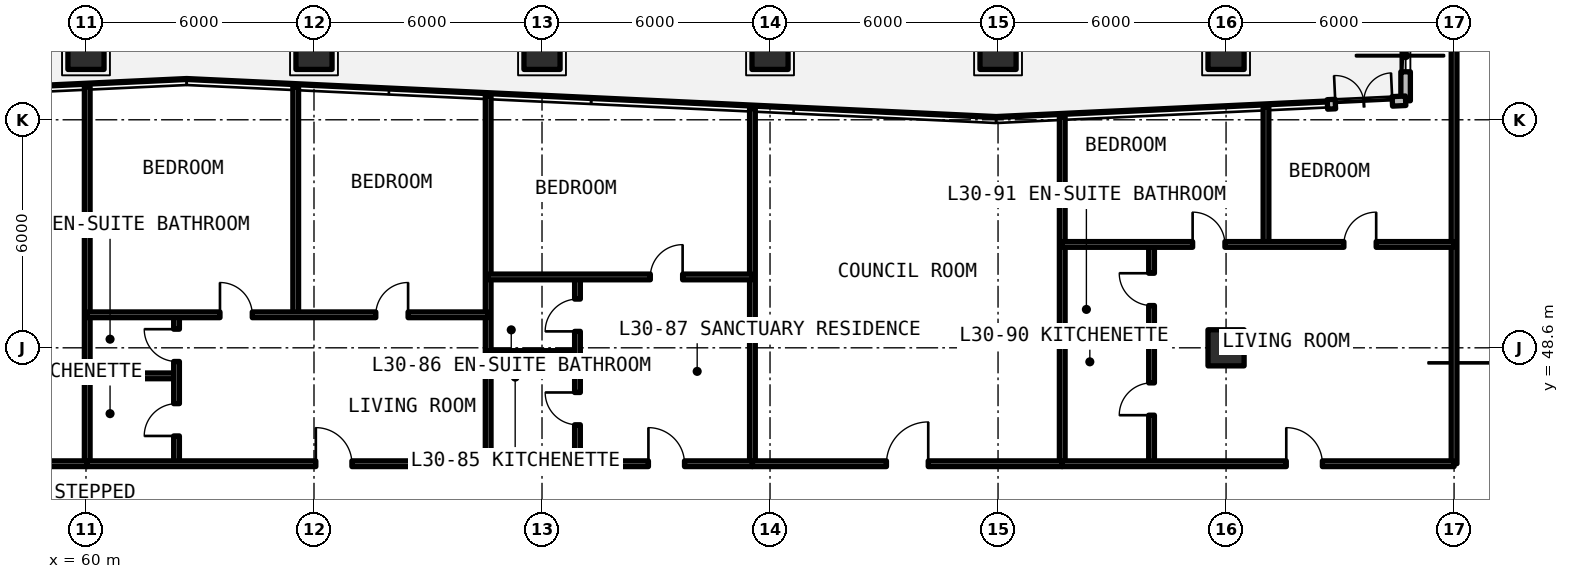
"""IFC4 building model, lengths in metres.
Left out: names, types, materials, properties, quantities, classifications, styles, units other than length and angle.
Written with IfcOpenShell. Run it as: python <this file> out.ifc"""

import sys

from ifc_helpers import new_model, si_unit, direction, frame, frame_2d, origin, origin_2d, place, context, subcontext, project, spatial, rectangle, extrude, element, fill, save


model = new_model("IFC4")
c1 = context("Model", 3, precision=1e-05, world=origin(), true_north=direction((0.0, 1.0)))
c2 = subcontext(c1, "Body", "Model", "MODEL_VIEW")
j1 = project(units=[si_unit("LENGTHUNIT", "METRE"), si_unit("PLANEANGLEUNIT", "RADIAN")], contexts=[c1])
p1 = place(None, origin())
s1 = spatial("IfcSite", under=j1, at=p1, CompositionType="ELEMENT")
p2 = place(p1, origin())
s2 = spatial("IfcBuilding", under=s1, at=p2, CompositionType="ELEMENT")
p3 = place(p2, frame((0.0, 0.0, 108.57)))
s3 = spatial("IfcBuildingStorey", under=s2, at=p3, CompositionType="ELEMENT", Elevation=108.57)
for number, where, z_axis, x_axis in (
    (1, (90.0, 48.6, 0.0), (0.0, 0.0, 1.0), (1.0, 0.0, 0.0)),
    (2, (60.0, 56.4, 0.0), (0.0, 0.0, 1.0), (1.0, 0.0, 0.0)),
    (3, (66.0, 56.4, 0.0), (0.0, 0.0, 1.0), (1.0, 0.0, 0.0)),
    (4, (72.0, 56.4, 0.0), (0.0, 0.0, 1.0), (1.0, 0.0, 0.0)),
    (5, (78.0, 56.4, 0.0), (0.0, 0.0, 1.0), (1.0, 0.0, 0.0)),
    (6, (84.0, 56.4, 0.0), (0.0, 0.0, 1.0), (1.0, 0.0, 0.0)),
    (7, (90.0, 56.4, 0.0), (0.0, 0.0, 1.0), (1.0, 0.0, 0.0)),
):
    element("IfcColumn", number, at=place(p3, frame(where, z_axis=z_axis, x_axis=x_axis)), inside=s3, PredefinedType="COLUMN", context=c2, shape_type="SweptSolid", body=[
        extrude(rectangle(XDim=0.95, YDim=0.95, at=origin_2d()), origin(), (0.0, 0.0, 1.0), 3.63),
    ])
p4 = place(p3, frame((94.725, 57.475, 0.0), z_axis=(0.0, 0.0, 1.0), x_axis=(0.0, -1.0, 0.0)))
e8 = element("IfcWall", 8, at=p4, inside=s3, PredefinedType="SOLIDWALL", context=c2, shape_type="SweptSolid", body=[
    extrude(rectangle(XDim=2.375, YDim=0.25, at=frame_2d((1.187, 0.0))), origin(), (0.0, 0.0, 1.0), 3.41),
])
p5 = place(p4, frame((0.762, 0.0, 0.78)))
e9 = element("IfcOpeningElement", 9, at=p5, cuts=e8, PredefinedType="OPENING", context=c2, shape_type="SweptSolid", body=[
    extrude(rectangle(XDim=0.85, YDim=1.65, at=frame_2d((0.425, 0.825))), frame((0.0, 0.135, 0.0), z_axis=(0.0, -1.0, 0.0), x_axis=(1.0, 0.0, 0.0)), (0.0, 0.0, 1.0), 0.27),
])
p6 = place(p3, frame((94.725, 55.101, 0.0), z_axis=(0.0, 0.0, 1.0), x_axis=(-0.998903780539, -0.046810652902, 0.0)))
e10 = element("IfcWall", 10, at=p6, inside=s3, PredefinedType="SOLIDWALL", context=c2, shape_type="SweptSolid", body=[
    extrude(rectangle(XDim=2.06, YDim=0.25, at=frame_2d((1.03, 0.0))), origin(), (0.0, 0.0, 1.0), 3.41),
])
p7 = place(p6, frame((0.35, 0.0, 0.0)))
e11 = element("IfcOpeningElement", 11, at=p7, cuts=e10, PredefinedType="OPENING", context=c2, shape_type="SweptSolid", body=[
    extrude(rectangle(XDim=1.5, YDim=2.2, at=frame_2d((0.75, 1.1))), frame((0.0, 0.135, 0.0), z_axis=(0.0, -1.0, 0.0), x_axis=(1.0, 0.0, 0.0)), (0.0, 0.0, 1.0), 0.27),
])
p8 = place(p3, frame((96.0, 45.55, 0.0), z_axis=(0.0, 0.0, 1.0), x_axis=(0.0, 1.0, 0.0)))
e12 = element("IfcWall", 12, at=p8, inside=s3, PredefinedType="SOLIDWALL", context=c2, shape_type="SweptSolid", body=[
    extrude(rectangle(XDim=11.925, YDim=0.15, at=frame_2d((5.962, 0.0))), origin(), (0.0, 0.0, 1.0), 2.63),
])
p9 = place(p3, frame((60.033, 45.55, 0.0), z_axis=(0.0, 0.0, 1.0), x_axis=(0.0, 1.0, 0.0)))
e13 = element("IfcWall", 13, at=p9, inside=s3, PredefinedType="SOLIDWALL", context=c2, shape_type="SweptSolid", body=[
    extrude(rectangle(XDim=9.922, YDim=0.15, at=frame_2d((4.961, 0.0))), origin(), (0.0, 0.0, 1.0), 2.63),
])
p10 = place(p3, frame((52.12, 45.55, 0.0), z_axis=(0.0, 0.0, 1.0), x_axis=(1.0, 0.0, 0.0)))
e14 = element("IfcWall", 14, at=p10, inside=s3, PredefinedType="SOLIDWALL", context=c2, shape_type="SweptSolid", body=[
    extrude(rectangle(XDim=7.913, YDim=0.15, at=frame_2d((3.956, 0.0))), origin(), (0.0, 0.0, 1.0), 2.63),
])
p11 = place(p10, frame((3.406, 0.0, 0.0)))
e15 = element("IfcOpeningElement", 15, at=p11, cuts=e14, PredefinedType="OPENING", context=c2, shape_type="SweptSolid", body=[
    extrude(rectangle(XDim=1.1, YDim=2.15, at=frame_2d((0.55, 1.075))), frame((0.0, 0.085, 0.0), z_axis=(0.0, -1.0, 0.0), x_axis=(1.0, 0.0, 0.0)), (0.0, 0.0, 1.0), 0.17),
])
p12 = place(p3, frame((70.583, 45.55, 0.0), z_axis=(0.0, 0.0, 1.0), x_axis=(0.0, 1.0, 0.0)))
e16 = element("IfcWall", 16, at=p12, inside=s3, PredefinedType="SOLIDWALL", context=c2, shape_type="SweptSolid", body=[
    extrude(rectangle(XDim=9.672, YDim=0.15, at=frame_2d((4.836, 0.0))), origin(), (0.0, 0.0, 1.0), 2.63),
])
p13 = place(p3, frame((60.033, 47.862, 0.0), z_axis=(0.0, 0.0, 1.0), x_axis=(1.0, 0.0, 0.0)))
e17 = element("IfcWall", 17, at=p13, inside=s3, PredefinedType="PARTITIONING", context=c2, shape_type="SweptSolid", body=[
    extrude(rectangle(XDim=2.35, YDim=0.15, at=frame_2d((1.175, 0.0))), origin(), (0.0, 0.0, 1.0), 2.63),
])
p14 = place(p3, frame((62.383, 45.55, 0.0), z_axis=(0.0, 0.0, 1.0), x_axis=(0.0, 1.0, 0.0)))
e18 = element("IfcWall", 18, at=p14, inside=s3, PredefinedType="PARTITIONING", context=c2, shape_type="SweptSolid", body=[
    extrude(rectangle(XDim=3.918, YDim=0.15, at=frame_2d((1.959, 0.0))), origin(), (0.0, 0.0, 1.0), 2.63),
])
p15 = place(p14, frame((0.731, 0.0, 0.0)))
e19 = element("IfcOpeningElement", 19, at=p15, cuts=e18, PredefinedType="OPENING", context=c2, shape_type="SweptSolid", body=[
    extrude(rectangle(XDim=0.85, YDim=2.1, at=frame_2d((0.425, 1.05))), frame((0.0, 0.085, 0.0), z_axis=(0.0, -1.0, 0.0), x_axis=(1.0, 0.0, 0.0)), (0.0, 0.0, 1.0), 0.17),
])
p16 = place(p14, frame((2.69, 0.0, 0.0)))
e20 = element("IfcOpeningElement", 20, at=p16, cuts=e18, PredefinedType="OPENING", context=c2, shape_type="SweptSolid", body=[
    extrude(rectangle(XDim=0.85, YDim=2.1, at=frame_2d((0.425, 1.05))), frame((0.0, 0.085, 0.0), z_axis=(0.0, -1.0, 0.0), x_axis=(1.0, 0.0, 0.0)), (0.0, 0.0, 1.0), 0.17),
])
p17 = place(p3, frame((65.519, 49.469, 0.0), z_axis=(0.0, 0.0, 1.0), x_axis=(0.0, 1.0, 0.0)))
e21 = element("IfcWall", 21, at=p17, inside=s3, PredefinedType="PARTITIONING", context=c2, shape_type="SweptSolid", body=[
    extrude(rectangle(XDim=5.992, YDim=0.15, at=frame_2d((2.996, 0.0))), origin(), (0.0, 0.0, 1.0), 2.63),
])
p18 = place(p3, frame((60.033, 49.469, 0.0), z_axis=(0.0, 0.0, 1.0), x_axis=(1.0, 0.0, 0.0)))
e22 = element("IfcWall", 22, at=p18, inside=s3, PredefinedType="PARTITIONING", context=c2, shape_type="SweptSolid", body=[
    extrude(rectangle(XDim=10.551, YDim=0.15, at=frame_2d((5.275, 0.0))), origin(), (0.0, 0.0, 1.0), 2.63),
])
p19 = place(p18, frame((3.493, 0.0, 0.0)))
e23 = element("IfcOpeningElement", 23, at=p19, cuts=e22, PredefinedType="OPENING", context=c2, shape_type="SweptSolid", body=[
    extrude(rectangle(XDim=0.85, YDim=2.1, at=frame_2d((0.425, 1.05))), frame((0.0, 0.085, 0.0), z_axis=(0.0, -1.0, 0.0), x_axis=(1.0, 0.0, 0.0)), (0.0, 0.0, 1.0), 0.17),
])
p20 = place(p18, frame((7.593, 0.0, 0.0)))
e24 = element("IfcOpeningElement", 24, at=p20, cuts=e22, PredefinedType="OPENING", context=c2, shape_type="SweptSolid", body=[
    extrude(rectangle(XDim=0.85, YDim=2.1, at=frame_2d((0.425, 1.05))), frame((0.0, 0.085, 0.0), z_axis=(0.0, -1.0, 0.0), x_axis=(1.0, 0.0, 0.0)), (0.0, 0.0, 1.0), 0.17),
])
p21 = place(p3, frame((60.033, 45.55, 0.0), z_axis=(0.0, 0.0, 1.0), x_axis=(1.0, 0.0, 0.0)))
e25 = element("IfcWall", 25, at=p21, inside=s3, PredefinedType="SOLIDWALL", context=c2, shape_type="SweptSolid", body=[
    extrude(rectangle(XDim=10.551, YDim=0.15, at=frame_2d((5.275, 0.0))), origin(), (0.0, 0.0, 1.0), 2.63),
])
p22 = place(p21, frame((6.015, 0.0, 0.0)))
e26 = element("IfcOpeningElement", 26, at=p22, cuts=e25, PredefinedType="OPENING", context=c2, shape_type="SweptSolid", body=[
    extrude(rectangle(XDim=0.95, YDim=2.15, at=frame_2d((0.475, 1.075))), frame((0.0, 0.085, 0.0), z_axis=(0.0, -1.0, 0.0), x_axis=(1.0, 0.0, 0.0)), (0.0, 0.0, 1.0), 0.17),
])
p23 = place(p3, frame((77.537, 45.55, 0.0), z_axis=(0.0, 0.0, 1.0), x_axis=(0.0, 1.0, 0.0)))
e27 = element("IfcWall", 27, at=p23, inside=s3, PredefinedType="SOLIDWALL", context=c2, shape_type="SweptSolid", body=[
    extrude(rectangle(XDim=9.346, YDim=0.15, at=frame_2d((4.673, 0.0))), origin(), (0.0, 0.0, 1.0), 2.63),
])
p24 = place(p3, frame((70.583, 48.45, 0.0), z_axis=(0.0, 0.0, 1.0), x_axis=(1.0, 0.0, 0.0)))
e28 = element("IfcWall", 28, at=p24, inside=s3, PredefinedType="PARTITIONING", context=c2, shape_type="SweptSolid", body=[
    extrude(rectangle(XDim=2.35, YDim=0.15, at=frame_2d((1.175, 0.0))), origin(), (0.0, 0.0, 1.0), 2.63),
])
p25 = place(p3, frame((72.933, 45.55, 0.0), z_axis=(0.0, 0.0, 1.0), x_axis=(0.0, 1.0, 0.0)))
e29 = element("IfcWall", 29, at=p25, inside=s3, PredefinedType="PARTITIONING", context=c2, shape_type="SweptSolid", body=[
    extrude(rectangle(XDim=4.915, YDim=0.15, at=frame_2d((2.458, 0.0))), origin(), (0.0, 0.0, 1.0), 2.63),
])
p26 = place(p25, frame((1.025, 0.0, 0.0)))
e30 = element("IfcOpeningElement", 30, at=p26, cuts=e29, PredefinedType="OPENING", context=c2, shape_type="SweptSolid", body=[
    extrude(rectangle(XDim=0.85, YDim=2.1, at=frame_2d((0.425, 1.05))), frame((0.0, 0.085, 0.0), z_axis=(0.0, -1.0, 0.0), x_axis=(1.0, 0.0, 0.0)), (0.0, 0.0, 1.0), 0.17),
])
p27 = place(p25, frame((3.482, 0.0, 0.0)))
e31 = element("IfcOpeningElement", 31, at=p27, cuts=e29, PredefinedType="OPENING", context=c2, shape_type="SweptSolid", body=[
    extrude(rectangle(XDim=0.85, YDim=2.1, at=frame_2d((0.425, 1.05))), frame((0.0, 0.085, 0.0), z_axis=(0.0, -1.0, 0.0), x_axis=(1.0, 0.0, 0.0)), (0.0, 0.0, 1.0), 0.17),
])
p28 = place(p3, frame((70.583, 50.465, 0.0), z_axis=(0.0, 0.0, 1.0), x_axis=(1.0, 0.0, 0.0)))
e32 = element("IfcWall", 32, at=p28, inside=s3, PredefinedType="PARTITIONING", context=c2, shape_type="SweptSolid", body=[
    extrude(rectangle(XDim=6.954, YDim=0.15, at=frame_2d((3.477, 0.0))), origin(), (0.0, 0.0, 1.0), 2.63),
])
p29 = place(p28, frame((4.267, 0.0, 0.0)))
e33 = element("IfcOpeningElement", 33, at=p29, cuts=e32, PredefinedType="OPENING", context=c2, shape_type="SweptSolid", body=[
    extrude(rectangle(XDim=0.85, YDim=2.1, at=frame_2d((0.425, 1.05))), frame((0.0, 0.085, 0.0), z_axis=(0.0, -1.0, 0.0), x_axis=(1.0, 0.0, 0.0)), (0.0, 0.0, 1.0), 0.17),
])
p30 = place(p3, frame((70.583, 45.55, 0.0), z_axis=(0.0, 0.0, 1.0), x_axis=(1.0, 0.0, 0.0)))
e34 = element("IfcWall", 34, at=p30, inside=s3, PredefinedType="SOLIDWALL", context=c2, shape_type="SweptSolid", body=[
    extrude(rectangle(XDim=6.954, YDim=0.15, at=frame_2d((3.477, 0.0))), origin(), (0.0, 0.0, 1.0), 2.63),
])
p31 = place(p30, frame((4.217, 0.0, 0.0)))
e35 = element("IfcOpeningElement", 35, at=p31, cuts=e34, PredefinedType="OPENING", context=c2, shape_type="SweptSolid", body=[
    extrude(rectangle(XDim=0.95, YDim=2.15, at=frame_2d((0.475, 1.075))), frame((0.0, 0.085, 0.0), z_axis=(0.0, -1.0, 0.0), x_axis=(1.0, 0.0, 0.0)), (0.0, 0.0, 1.0), 0.17),
])
p32 = place(p3, frame((85.689, 45.55, 0.0), z_axis=(0.0, 0.0, 1.0), x_axis=(0.0, 1.0, 0.0)))
e36 = element("IfcWall", 36, at=p32, inside=s3, PredefinedType="SOLIDWALL", context=c2, shape_type="SweptSolid", body=[
    extrude(rectangle(XDim=9.126, YDim=0.15, at=frame_2d((4.563, 0.0))), origin(), (0.0, 0.0, 1.0), 2.63),
])
p33 = place(p3, frame((77.537, 45.55, 0.0), z_axis=(0.0, 0.0, 1.0), x_axis=(1.0, 0.0, 0.0)))
e37 = element("IfcWall", 37, at=p33, inside=s3, PredefinedType="SOLIDWALL", context=c2, shape_type="SweptSolid", body=[
    extrude(rectangle(XDim=8.153, YDim=0.15, at=frame_2d((4.076, 0.0))), origin(), (0.0, 0.0, 1.0), 2.63),
])
p34 = place(p33, frame((3.526, 0.0, 0.0)))
e38 = element("IfcOpeningElement", 38, at=p34, cuts=e37, PredefinedType="OPENING", context=c2, shape_type="SweptSolid", body=[
    extrude(rectangle(XDim=1.1, YDim=2.15, at=frame_2d((0.55, 1.075))), frame((0.0, 0.085, 0.0), z_axis=(0.0, -1.0, 0.0), x_axis=(1.0, 0.0, 0.0)), (0.0, 0.0, 1.0), 0.17),
])
p35 = place(p3, frame((85.689, 48.954, 0.0), z_axis=(0.0, 0.0, 1.0), x_axis=(1.0, 0.0, 0.0)))
e39 = element("IfcWall", 39, at=p35, inside=s3, PredefinedType="PARTITIONING", context=c2, shape_type="SweptSolid", body=[
    extrude(rectangle(XDim=2.35, YDim=0.15, at=frame_2d((1.175, 0.0))), origin(), (0.0, 0.0, 1.0), 2.63),
])
p36 = place(p3, frame((88.04, 45.55, 0.0), z_axis=(0.0, 0.0, 1.0), x_axis=(0.0, 1.0, 0.0)))
e40 = element("IfcWall", 40, at=p36, inside=s3, PredefinedType="PARTITIONING", context=c2, shape_type="SweptSolid", body=[
    extrude(rectangle(XDim=5.77, YDim=0.15, at=frame_2d((2.885, 0.0))), origin(), (0.0, 0.0, 1.0), 2.63),
])
p37 = place(p36, frame((1.277, 0.0, 0.0)))
e41 = element("IfcOpeningElement", 41, at=p37, cuts=e40, PredefinedType="OPENING", context=c2, shape_type="SweptSolid", body=[
    extrude(rectangle(XDim=0.85, YDim=2.1, at=frame_2d((0.425, 1.05))), frame((0.0, 0.085, 0.0), z_axis=(0.0, -1.0, 0.0), x_axis=(1.0, 0.0, 0.0)), (0.0, 0.0, 1.0), 0.17),
])
p38 = place(p36, frame((4.162, 0.0, 0.0)))
e42 = element("IfcOpeningElement", 42, at=p38, cuts=e40, PredefinedType="OPENING", context=c2, shape_type="SweptSolid", body=[
    extrude(rectangle(XDim=0.85, YDim=2.1, at=frame_2d((0.425, 1.05))), frame((0.0, 0.085, 0.0), z_axis=(0.0, -1.0, 0.0), x_axis=(1.0, 0.0, 0.0)), (0.0, 0.0, 1.0), 0.17),
])
p39 = place(p3, frame((91.051, 51.32, 0.0), z_axis=(0.0, 0.0, 1.0), x_axis=(0.0, 1.0, 0.0)))
e43 = element("IfcWall", 43, at=p39, inside=s3, PredefinedType="PARTITIONING", context=c2, shape_type="SweptSolid", body=[
    extrude(rectangle(XDim=3.608, YDim=0.15, at=frame_2d((1.804, 0.0))), origin(), (0.0, 0.0, 1.0), 2.63),
])
p40 = place(p3, frame((85.689, 51.32, 0.0), z_axis=(0.0, 0.0, 1.0), x_axis=(1.0, 0.0, 0.0)))
e44 = element("IfcWall", 44, at=p40, inside=s3, PredefinedType="PARTITIONING", context=c2, shape_type="SweptSolid", body=[
    extrude(rectangle(XDim=10.311, YDim=0.15, at=frame_2d((5.155, 0.0))), origin(), (0.0, 0.0, 1.0), 2.63),
])
p41 = place(p40, frame((3.431, 0.0, 0.0)))
e45 = element("IfcOpeningElement", 45, at=p41, cuts=e44, PredefinedType="OPENING", context=c2, shape_type="SweptSolid", body=[
    extrude(rectangle(XDim=0.85, YDim=2.1, at=frame_2d((0.425, 1.05))), frame((0.0, 0.085, 0.0), z_axis=(0.0, -1.0, 0.0), x_axis=(1.0, 0.0, 0.0)), (0.0, 0.0, 1.0), 0.17),
])
p42 = place(p40, frame((7.411, 0.0, 0.0)))
e46 = element("IfcOpeningElement", 46, at=p42, cuts=e44, PredefinedType="OPENING", context=c2, shape_type="SweptSolid", body=[
    extrude(rectangle(XDim=0.85, YDim=2.1, at=frame_2d((0.425, 1.05))), frame((0.0, 0.085, 0.0), z_axis=(0.0, -1.0, 0.0), x_axis=(1.0, 0.0, 0.0)), (0.0, 0.0, 1.0), 0.17),
])
p43 = place(p3, frame((85.689, 45.55, 0.0), z_axis=(0.0, 0.0, 1.0), x_axis=(1.0, 0.0, 0.0)))
e47 = element("IfcWall", 47, at=p43, inside=s3, PredefinedType="SOLIDWALL", context=c2, shape_type="SweptSolid", body=[
    extrude(rectangle(XDim=10.311, YDim=0.15, at=frame_2d((5.155, 0.0))), origin(), (0.0, 0.0, 1.0), 2.63),
])
p44 = place(p43, frame((5.895, 0.0, 0.0)))
e48 = element("IfcOpeningElement", 48, at=p44, cuts=e47, PredefinedType="OPENING", context=c2, shape_type="SweptSolid", body=[
    extrude(rectangle(XDim=0.95, YDim=2.15, at=frame_2d((0.475, 1.075))), frame((0.0, 0.085, 0.0), z_axis=(0.0, -1.0, 0.0), x_axis=(1.0, 0.0, 0.0)), (0.0, 0.0, 1.0), 0.17),
])
p45 = place(p5, origin())
e49 = element("IfcWindow", 49, at=p45, inside=s3, PartitioningType="SINGLE_PANEL", PredefinedType="WINDOW", context=c2, shape_type="SweptSolid", body=[
    extrude(rectangle(XDim=0.85, YDim=1.65, at=frame_2d((0.425, 0.825))), frame((0.0, 0.03, 0.0), z_axis=(0.0, -1.0, 0.0), x_axis=(1.0, 0.0, 0.0)), (0.0, 0.0, 1.0), 0.06),
])
fill(e9, e49)
p46 = place(p7, frame((1.5, 0.0, 0.0), z_axis=(0.0, 0.0, 1.0), x_axis=(-1.0, 0.0, 0.0)))
e50 = element("IfcDoor", 50, at=p46, inside=s3, OperationType="SINGLE_SWING_RIGHT", PredefinedType="DOOR", context=c2, shape_type="SweptSolid", body=[
    extrude(rectangle(XDim=1.5, YDim=2.2, at=frame_2d((0.75, 1.1))), frame((0.0, 0.025, 0.0), z_axis=(0.0, -1.0, 0.0), x_axis=(1.0, 0.0, 0.0)), (0.0, 0.0, 1.0), 0.05),
])
fill(e11, e50)
p47 = place(p15, origin())
e51 = element("IfcDoor", 51, at=p47, inside=s3, OperationType="SINGLE_SWING_LEFT", PredefinedType="DOOR", context=c2, shape_type="SweptSolid", body=[
    extrude(rectangle(XDim=0.85, YDim=2.1, at=frame_2d((0.425, 1.05))), frame((0.0, 0.025, 0.0), z_axis=(0.0, -1.0, 0.0), x_axis=(1.0, 0.0, 0.0)), (0.0, 0.0, 1.0), 0.05),
])
fill(e19, e51)
p48 = place(p16, origin())
e52 = element("IfcDoor", 52, at=p48, inside=s3, OperationType="SINGLE_SWING_RIGHT", PredefinedType="DOOR", context=c2, shape_type="SweptSolid", body=[
    extrude(rectangle(XDim=0.85, YDim=2.1, at=frame_2d((0.425, 1.05))), frame((0.0, 0.025, 0.0), z_axis=(0.0, -1.0, 0.0), x_axis=(1.0, 0.0, 0.0)), (0.0, 0.0, 1.0), 0.05),
])
fill(e20, e52)
p49 = place(p19, origin())
e53 = element("IfcDoor", 53, at=p49, inside=s3, OperationType="SINGLE_SWING_LEFT", PredefinedType="DOOR", context=c2, shape_type="SweptSolid", body=[
    extrude(rectangle(XDim=0.85, YDim=2.1, at=frame_2d((0.425, 1.05))), frame((0.0, 0.025, 0.0), z_axis=(0.0, -1.0, 0.0), x_axis=(1.0, 0.0, 0.0)), (0.0, 0.0, 1.0), 0.05),
])
fill(e23, e53)
p50 = place(p20, origin())
e54 = element("IfcDoor", 54, at=p50, inside=s3, OperationType="SINGLE_SWING_RIGHT", PredefinedType="DOOR", context=c2, shape_type="SweptSolid", body=[
    extrude(rectangle(XDim=0.85, YDim=2.1, at=frame_2d((0.425, 1.05))), frame((0.0, 0.025, 0.0), z_axis=(0.0, -1.0, 0.0), x_axis=(1.0, 0.0, 0.0)), (0.0, 0.0, 1.0), 0.05),
])
fill(e24, e54)
p51 = place(p22, origin())
e55 = element("IfcDoor", 55, at=p51, inside=s3, OperationType="SINGLE_SWING_LEFT", PredefinedType="DOOR", context=c2, shape_type="SweptSolid", body=[
    extrude(rectangle(XDim=0.95, YDim=2.15, at=frame_2d((0.475, 1.075))), frame((0.0, 0.025, 0.0), z_axis=(0.0, -1.0, 0.0), x_axis=(1.0, 0.0, 0.0)), (0.0, 0.0, 1.0), 0.05),
])
fill(e26, e55)
p52 = place(p26, origin())
e56 = element("IfcDoor", 56, at=p52, inside=s3, OperationType="SINGLE_SWING_RIGHT", PredefinedType="DOOR", context=c2, shape_type="SweptSolid", body=[
    extrude(rectangle(XDim=0.85, YDim=2.1, at=frame_2d((0.425, 1.05))), frame((0.0, 0.025, 0.0), z_axis=(0.0, -1.0, 0.0), x_axis=(1.0, 0.0, 0.0)), (0.0, 0.0, 1.0), 0.05),
])
fill(e30, e56)
p53 = place(p27, origin())
e57 = element("IfcDoor", 57, at=p53, inside=s3, OperationType="SINGLE_SWING_LEFT", PredefinedType="DOOR", context=c2, shape_type="SweptSolid", body=[
    extrude(rectangle(XDim=0.85, YDim=2.1, at=frame_2d((0.425, 1.05))), frame((0.0, 0.025, 0.0), z_axis=(0.0, -1.0, 0.0), x_axis=(1.0, 0.0, 0.0)), (0.0, 0.0, 1.0), 0.05),
])
fill(e31, e57)
p54 = place(p29, origin())
e58 = element("IfcDoor", 58, at=p54, inside=s3, OperationType="SINGLE_SWING_RIGHT", PredefinedType="DOOR", context=c2, shape_type="SweptSolid", body=[
    extrude(rectangle(XDim=0.85, YDim=2.1, at=frame_2d((0.425, 1.05))), frame((0.0, 0.025, 0.0), z_axis=(0.0, -1.0, 0.0), x_axis=(1.0, 0.0, 0.0)), (0.0, 0.0, 1.0), 0.05),
])
fill(e33, e58)
p55 = place(p31, origin())
e59 = element("IfcDoor", 59, at=p55, inside=s3, OperationType="SINGLE_SWING_LEFT", PredefinedType="DOOR", context=c2, shape_type="SweptSolid", body=[
    extrude(rectangle(XDim=0.95, YDim=2.15, at=frame_2d((0.475, 1.075))), frame((0.0, 0.025, 0.0), z_axis=(0.0, -1.0, 0.0), x_axis=(1.0, 0.0, 0.0)), (0.0, 0.0, 1.0), 0.05),
])
fill(e35, e59)
p56 = place(p34, origin())
e60 = element("IfcDoor", 60, at=p56, inside=s3, OperationType="SINGLE_SWING_RIGHT", PredefinedType="DOOR", context=c2, shape_type="SweptSolid", body=[
    extrude(rectangle(XDim=1.1, YDim=2.15, at=frame_2d((0.55, 1.075))), frame((0.0, 0.025, 0.0), z_axis=(0.0, -1.0, 0.0), x_axis=(1.0, 0.0, 0.0)), (0.0, 0.0, 1.0), 0.05),
])
fill(e38, e60)
p57 = place(p37, origin())
e61 = element("IfcDoor", 61, at=p57, inside=s3, OperationType="SINGLE_SWING_LEFT", PredefinedType="DOOR", context=c2, shape_type="SweptSolid", body=[
    extrude(rectangle(XDim=0.85, YDim=2.1, at=frame_2d((0.425, 1.05))), frame((0.0, 0.025, 0.0), z_axis=(0.0, -1.0, 0.0), x_axis=(1.0, 0.0, 0.0)), (0.0, 0.0, 1.0), 0.05),
])
fill(e41, e61)
p58 = place(p38, origin())
e62 = element("IfcDoor", 62, at=p58, inside=s3, OperationType="SINGLE_SWING_RIGHT", PredefinedType="DOOR", context=c2, shape_type="SweptSolid", body=[
    extrude(rectangle(XDim=0.85, YDim=2.1, at=frame_2d((0.425, 1.05))), frame((0.0, 0.025, 0.0), z_axis=(0.0, -1.0, 0.0), x_axis=(1.0, 0.0, 0.0)), (0.0, 0.0, 1.0), 0.05),
])
fill(e42, e62)
p59 = place(p41, origin())
e63 = element("IfcDoor", 63, at=p59, inside=s3, OperationType="SINGLE_SWING_LEFT", PredefinedType="DOOR", context=c2, shape_type="SweptSolid", body=[
    extrude(rectangle(XDim=0.85, YDim=2.1, at=frame_2d((0.425, 1.05))), frame((0.0, 0.025, 0.0), z_axis=(0.0, -1.0, 0.0), x_axis=(1.0, 0.0, 0.0)), (0.0, 0.0, 1.0), 0.05),
])
fill(e45, e63)
p60 = place(p42, origin())
e64 = element("IfcDoor", 64, at=p60, inside=s3, OperationType="SINGLE_SWING_RIGHT", PredefinedType="DOOR", context=c2, shape_type="SweptSolid", body=[
    extrude(rectangle(XDim=0.85, YDim=2.1, at=frame_2d((0.425, 1.05))), frame((0.0, 0.025, 0.0), z_axis=(0.0, -1.0, 0.0), x_axis=(1.0, 0.0, 0.0)), (0.0, 0.0, 1.0), 0.05),
])
fill(e46, e64)
p61 = place(p44, origin())
e65 = element("IfcDoor", 65, at=p61, inside=s3, OperationType="SINGLE_SWING_LEFT", PredefinedType="DOOR", context=c2, shape_type="SweptSolid", body=[
    extrude(rectangle(XDim=0.95, YDim=2.15, at=frame_2d((0.475, 1.075))), frame((0.0, 0.025, 0.0), z_axis=(0.0, -1.0, 0.0), x_axis=(1.0, 0.0, 0.0)), (0.0, 0.0, 1.0), 0.05),
])
fill(e48, e65)
save(model, sys.argv[1])
